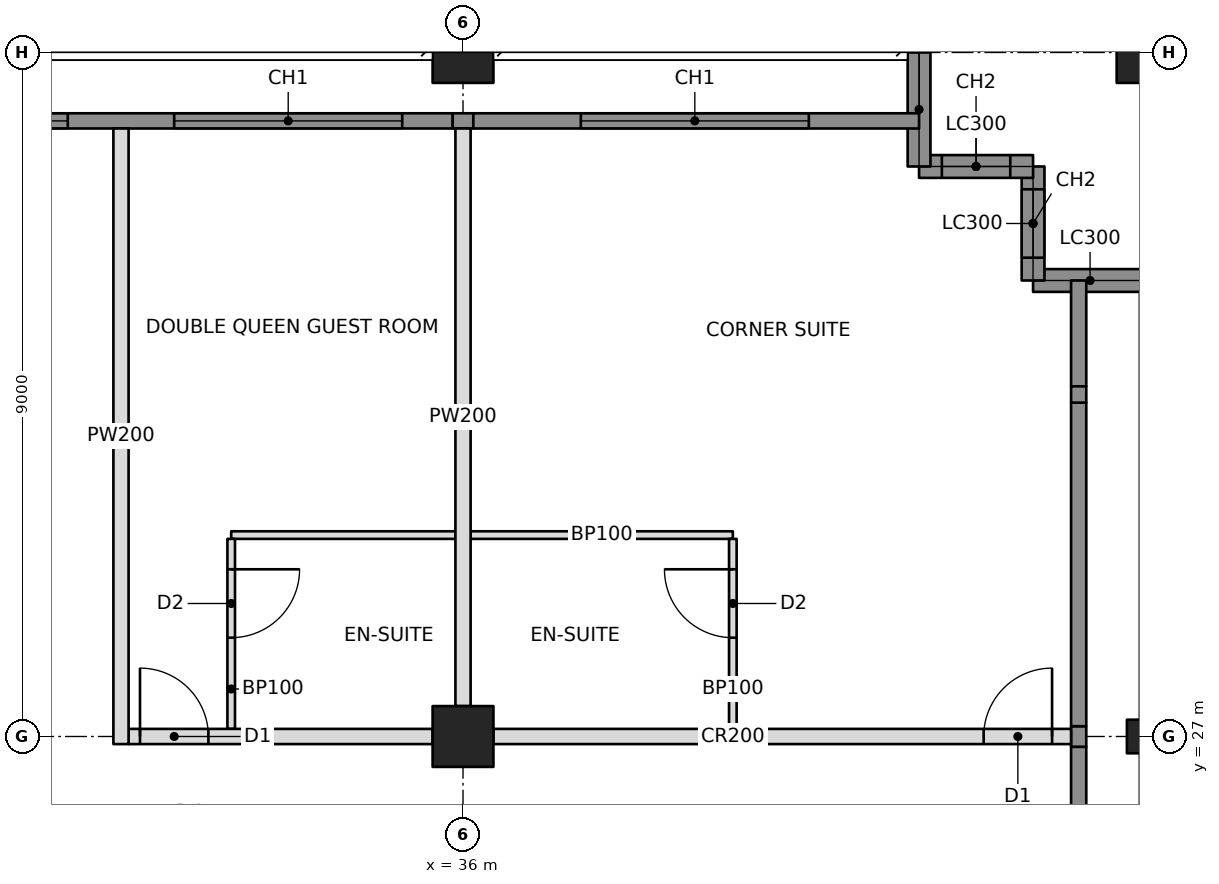
"""IFC4 building model, lengths in metres.
Left out: names, types, materials, properties, quantities, classifications, styles, units other than length and angle.
Written with IfcOpenShell. Run it as: python <this file> out.ifc"""

import sys

from ifc_helpers import new_model, si_unit, direction, frame, frame_2d, origin, origin_2d, place, context, subcontext, project, spatial, rectangle, hollow_rectangle, i_section, extrude, element, fill, save


model = new_model("IFC4")
c1 = context("Model", 3, precision=1e-05, world=origin(), true_north=direction((0.0, 1.0)))
c2 = subcontext(c1, "Body", "Model", "MODEL_VIEW")
j1 = project(units=[si_unit("LENGTHUNIT", "METRE"), si_unit("PLANEANGLEUNIT", "RADIAN")], contexts=[c1])
p1 = place(None, origin())
s1 = spatial("IfcSite", under=j1, at=p1, CompositionType="ELEMENT")
p2 = place(p1, origin())
s2 = spatial("IfcBuilding", under=s1, at=p2, CompositionType="ELEMENT")
p3 = place(p2, frame((0.0, 0.0, 124.8)))
s3 = spatial("IfcBuildingStorey", under=s2, at=p3, CompositionType="ELEMENT", Elevation=124.8)
p4 = place(p3, frame((36.0, 27.0, 0.0), z_axis=(0.0, 0.0, 1.0), x_axis=(1.0, 0.0, 0.0)))
e1 = element("IfcColumn", 1, at=p4, inside=s3, PredefinedType="COLUMN", context=c2, shape_type="SweptSolid", body=[
    extrude(hollow_rectangle(XDim=0.8, YDim=0.8, WallThickness=0.07, at=origin_2d()), origin(), (0.0, 0.0, 1.0), 3.4),
])
p5 = place(p3, frame((36.0, 36.0, 0.0), z_axis=(0.0, 0.0, 1.0), x_axis=(1.0, 0.0, 0.0)))
e2 = element("IfcColumn", 2, at=p5, inside=s3, PredefinedType="COLUMN", context=c2, shape_type="SweptSolid", body=[
    extrude(hollow_rectangle(XDim=0.8, YDim=0.8, WallThickness=0.06, at=origin_2d()), origin(), (0.0, 0.0, 1.0), 3.4),
])
p6 = place(p3, frame((45.0, 27.0, 0.0), z_axis=(0.0, 0.0, 1.0), x_axis=(0.0, 1.0, 0.0)))
e3 = element("IfcColumn", 3, at=p6, inside=s3, PredefinedType="COLUMN", context=c2, shape_type="SweptSolid", body=[
    extrude(i_section(OverallWidth=0.442, OverallDepth=0.531, WebThickness=0.066, FlangeThickness=0.106, at=origin_2d()), origin(), (0.0, 0.0, 1.0), 3.4),
])
p7 = place(p3, frame((45.0, 36.0, 0.0), z_axis=(0.0, 0.0, 1.0), x_axis=(1.0, 0.0, 0.0)))
e4 = element("IfcColumn", 4, at=p7, inside=s3, PredefinedType="COLUMN", context=c2, shape_type="SweptSolid", body=[
    extrude(hollow_rectangle(XDim=0.8, YDim=0.8, WallThickness=0.06, at=origin_2d()), origin(), (0.0, 0.0, 1.0), 3.4),
])
p8 = place(p3, frame((45.0, 33.0, 0.0), z_axis=(0.0, 0.0, 1.0), x_axis=(-1.0, 0.0, 0.0)))
e5 = element("IfcWall", 5, at=p8, inside=s3, PredefinedType="SOLIDWALL", context=c2, shape_type="SweptSolid", body=[
    extrude(rectangle(XDim=1.5, YDim=0.3, at=frame_2d((0.75, 0.0))), origin(), (0.0, 0.0, 1.0), 2.42),
])
p9 = place(p3, frame((43.5, 33.0, 0.0), z_axis=(0.0, 0.0, 1.0), x_axis=(0.0, 1.0, 0.0)))
e6 = element("IfcWall", 6, at=p9, inside=s3, PredefinedType="SOLIDWALL", context=c2, shape_type="SweptSolid", body=[
    extrude(rectangle(XDim=1.5, YDim=0.3, at=frame_2d((0.75, 0.0))), origin(), (0.0, 0.0, 1.0), 3.2),
])
p10 = place(p9, frame((0.3, 0.0, 0.6)))
e7 = element("IfcOpeningElement", 7, at=p10, cuts=e6, PredefinedType="OPENING", context=c2, shape_type="SweptSolid", body=[
    extrude(rectangle(XDim=0.9, YDim=2.2, at=frame_2d((0.45, 1.1))), frame((0.0, 0.16, 0.0), z_axis=(0.0, -1.0, 0.0), x_axis=(1.0, 0.0, 0.0)), (0.0, 0.0, 1.0), 0.32),
])
p11 = place(p3, frame((43.5, 34.5, 0.0), z_axis=(0.0, 0.0, 1.0), x_axis=(-1.0, 0.0, 0.0)))
e8 = element("IfcWall", 8, at=p11, inside=s3, PredefinedType="SOLIDWALL", context=c2, shape_type="SweptSolid", body=[
    extrude(rectangle(XDim=1.5, YDim=0.3, at=frame_2d((0.75, 0.0))), origin(), (0.0, 0.0, 1.0), 3.2),
])
p12 = place(p11, frame((0.3, 0.0, 0.6)))
e9 = element("IfcOpeningElement", 9, at=p12, cuts=e8, PredefinedType="OPENING", context=c2, shape_type="SweptSolid", body=[
    extrude(rectangle(XDim=0.9, YDim=2.2, at=frame_2d((0.45, 1.1))), frame((0.0, 0.16, 0.0), z_axis=(0.0, -1.0, 0.0), x_axis=(1.0, 0.0, 0.0)), (0.0, 0.0, 1.0), 0.32),
])
p13 = place(p3, frame((42.0, 34.5, 0.0), z_axis=(0.0, 0.0, 1.0), x_axis=(0.0, 1.0, 0.0)))
e10 = element("IfcWall", 10, at=p13, inside=s3, PredefinedType="SOLIDWALL", context=c2, shape_type="SweptSolid", body=[
    extrude(rectangle(XDim=1.5, YDim=0.3, at=frame_2d((0.75, 0.0))), origin(), (0.0, 0.0, 1.0), 2.42),
])
p14 = place(p3, frame((31.6, 27.0, 0.0), z_axis=(0.0, 0.0, 1.0), x_axis=(1.0, 0.0, 0.0)))
e11 = element("IfcWall", 11, at=p14, inside=s3, PredefinedType="PARTITIONING", context=c2, shape_type="SweptSolid", body=[
    extrude(rectangle(XDim=4.0, YDim=0.2, at=frame_2d((2.0, 0.0))), origin(), (0.0, 0.0, 1.0), 2.405),
])
p15 = place(p14, frame((0.15, 0.0, 0.0)))
e12 = element("IfcOpeningElement", 12, at=p15, cuts=e11, PredefinedType="OPENING", context=c2, shape_type="SweptSolid", body=[
    extrude(rectangle(XDim=0.9, YDim=2.1, at=frame_2d((0.45, 1.05))), frame((0.0, 0.11, 0.0), z_axis=(0.0, -1.0, 0.0), x_axis=(1.0, 0.0, 0.0)), (0.0, 0.0, 1.0), 0.22),
])
p16 = place(p3, frame((36.4, 27.0, 0.0), z_axis=(0.0, 0.0, 1.0), x_axis=(1.0, 0.0, 0.0)))
e13 = element("IfcWall", 13, at=p16, inside=s3, PredefinedType="PARTITIONING", context=c2, shape_type="SweptSolid", body=[
    extrude(rectangle(XDim=7.6, YDim=0.2, at=frame_2d((3.8, 0.0))), origin(), (0.0, 0.0, 1.0), 2.438),
])
p17 = place(p16, frame((6.45, 0.0, 0.0)))
e14 = element("IfcOpeningElement", 14, at=p17, cuts=e13, PredefinedType="OPENING", context=c2, shape_type="SweptSolid", body=[
    extrude(rectangle(XDim=0.9, YDim=2.1, at=frame_2d((0.45, 1.05))), frame((0.0, 0.11, 0.0), z_axis=(0.0, -1.0, 0.0), x_axis=(1.0, 0.0, 0.0)), (0.0, 0.0, 1.0), 0.22),
])
p18 = place(p3, frame((31.5, 26.9, 0.0), z_axis=(0.0, 0.0, 1.0), x_axis=(0.0, 1.0, 0.0)))
e15 = element("IfcWall", 15, at=p18, inside=s3, PredefinedType="PARTITIONING", context=c2, shape_type="SweptSolid", body=[
    extrude(rectangle(XDim=8.1, YDim=0.2, at=frame_2d((4.05, 0.0))), origin(), (0.0, 0.0, 1.0), 2.404),
])
p19 = place(p3, frame((36.0, 27.4, 0.0), z_axis=(0.0, 0.0, 1.0), x_axis=(0.0, 1.0, 0.0)))
e16 = element("IfcWall", 16, at=p19, inside=s3, PredefinedType="PARTITIONING", context=c2, shape_type="SweptSolid", body=[
    extrude(rectangle(XDim=7.6, YDim=0.2, at=frame_2d((3.8, 0.0))), origin(), (0.0, 0.0, 1.0), 2.438),
])
p20 = place(p3, frame((32.95, 29.65, 0.0), z_axis=(0.0, 0.0, 1.0), x_axis=(1.0, 0.0, 0.0)))
e17 = element("IfcWall", 17, at=p20, inside=s3, PredefinedType="PARTITIONING", context=c2, shape_type="SweptSolid", body=[
    extrude(rectangle(XDim=2.95, YDim=0.1, at=frame_2d((1.475, 0.0))), origin(), (0.0, 0.0, 1.0), 2.438),
])
p21 = place(p3, frame((32.95, 27.1, 0.0), z_axis=(0.0, 0.0, 1.0), x_axis=(0.0, 1.0, 0.0)))
e18 = element("IfcWall", 18, at=p21, inside=s3, PredefinedType="PARTITIONING", context=c2, shape_type="SweptSolid", body=[
    extrude(rectangle(XDim=2.5, YDim=0.1, at=frame_2d((1.25, 0.0))), origin(), (0.0, 0.0, 1.0), 2.404),
])
p22 = place(p21, frame((1.2, 0.0, 0.0)))
e19 = element("IfcOpeningElement", 19, at=p22, cuts=e18, PredefinedType="OPENING", context=c2, shape_type="SweptSolid", body=[
    extrude(rectangle(XDim=0.9, YDim=2.1, at=frame_2d((0.45, 1.05))), frame((0.0, 0.06, 0.0), z_axis=(0.0, -1.0, 0.0), x_axis=(1.0, 0.0, 0.0)), (0.0, 0.0, 1.0), 0.12),
])
p23 = place(p3, frame((36.1, 29.65, 0.0), z_axis=(0.0, 0.0, 1.0), x_axis=(1.0, 0.0, 0.0)))
e20 = element("IfcWall", 20, at=p23, inside=s3, PredefinedType="PARTITIONING", context=c2, shape_type="SweptSolid", body=[
    extrude(rectangle(XDim=3.45, YDim=0.1, at=frame_2d((1.725, 0.0))), origin(), (0.0, 0.0, 1.0), 2.438),
])
p24 = place(p3, frame((39.55, 27.1, 0.0), z_axis=(0.0, 0.0, 1.0), x_axis=(0.0, 1.0, 0.0)))
e21 = element("IfcWall", 21, at=p24, inside=s3, PredefinedType="PARTITIONING", context=c2, shape_type="SweptSolid", body=[
    extrude(rectangle(XDim=2.5, YDim=0.1, at=frame_2d((1.25, 0.0))), origin(), (0.0, 0.0, 1.0), 2.438),
])
p25 = place(p24, frame((1.2, 0.0, 0.0)))
e22 = element("IfcOpeningElement", 22, at=p25, cuts=e21, PredefinedType="OPENING", context=c2, shape_type="SweptSolid", body=[
    extrude(rectangle(XDim=0.9, YDim=2.1, at=frame_2d((0.45, 1.05))), frame((0.0, 0.06, 0.0), z_axis=(0.0, -1.0, 0.0), x_axis=(1.0, 0.0, 0.0)), (0.0, 0.0, 1.0), 0.12),
])
p26 = place(p3, frame((27.194, 35.1, 0.0), z_axis=(0.0, 0.0, 1.0), x_axis=(1.0, 0.0, 0.0)))
e23 = element("IfcWall", 23, at=p26, inside=s3, PredefinedType="SOLIDWALL", context=c2, shape_type="SweptSolid", body=[
    extrude(rectangle(XDim=8.671, YDim=0.2, at=frame_2d((4.335, 0.0))), origin(), (0.0, 0.0, 1.0), 3.2),
])
p27 = place(p26, frame((0.606, 0.0, 0.6)))
e24 = element("IfcOpeningElement", 24, at=p27, cuts=e23, PredefinedType="OPENING", context=c2, shape_type="SweptSolid", body=[
    extrude(rectangle(XDim=3.0, YDim=2.2, at=frame_2d((1.5, 1.1))), frame((0.0, 0.11, 0.0), z_axis=(0.0, -1.0, 0.0), x_axis=(1.0, 0.0, 0.0)), (0.0, 0.0, 1.0), 0.22),
])
p28 = place(p26, frame((5.006, 0.0, 0.6)))
e25 = element("IfcOpeningElement", 25, at=p28, cuts=e23, PredefinedType="OPENING", context=c2, shape_type="SweptSolid", body=[
    extrude(rectangle(XDim=3.0, YDim=2.2, at=frame_2d((1.5, 1.1))), frame((0.0, 0.11, 0.0), z_axis=(0.0, -1.0, 0.0), x_axis=(1.0, 0.0, 0.0)), (0.0, 0.0, 1.0), 0.22),
])
p29 = place(p3, frame((35.865, 35.1, 0.0), z_axis=(0.0, 0.0, 1.0), x_axis=(1.0, 0.0, 0.0)))
e26 = element("IfcWall", 26, at=p29, inside=s3, PredefinedType="SOLIDWALL", context=c2, shape_type="SweptSolid", body=[
    extrude(rectangle(XDim=0.271, YDim=0.2, at=frame_2d((0.135, 0.0))), origin(), (0.0, 0.0, 1.0), 2.438),
])
p30 = place(p3, frame((36.135, 35.1, 0.0), z_axis=(0.0, 0.0, 1.0), x_axis=(1.0, 0.0, 0.0)))
e27 = element("IfcWall", 27, at=p30, inside=s3, PredefinedType="SOLIDWALL", context=c2, shape_type="SweptSolid", body=[
    extrude(rectangle(XDim=5.865, YDim=0.2, at=frame_2d((2.932, 0.0))), origin(), (0.0, 0.0, 1.0), 3.2),
])
p31 = place(p30, frame((1.415, 0.0, 0.6)))
e28 = element("IfcOpeningElement", 28, at=p31, cuts=e27, PredefinedType="OPENING", context=c2, shape_type="SweptSolid", body=[
    extrude(rectangle(XDim=3.0, YDim=2.2, at=frame_2d((1.5, 1.1))), frame((0.0, 0.11, 0.0), z_axis=(0.0, -1.0, 0.0), x_axis=(1.0, 0.0, 0.0)), (0.0, 0.0, 1.0), 0.22),
])
p32 = place(p3, frame((44.1, 18.194, 0.0), z_axis=(0.0, 0.0, 1.0), x_axis=(0.0, 1.0, 0.0)))
e29 = element("IfcWall", 29, at=p32, inside=s3, PredefinedType="SOLIDWALL", context=c2, shape_type="SweptSolid", body=[
    extrude(rectangle(XDim=8.671, YDim=0.2, at=frame_2d((4.335, 0.0))), origin(), (0.0, 0.0, 1.0), 3.2),
])
p33 = place(p32, frame((0.156, 0.0, 0.6)))
e30 = element("IfcOpeningElement", 30, at=p33, cuts=e29, PredefinedType="OPENING", context=c2, shape_type="SweptSolid", body=[
    extrude(rectangle(XDim=3.0, YDim=2.2, at=frame_2d((1.5, 1.1))), frame((0.0, 0.11, 0.0), z_axis=(0.0, -1.0, 0.0), x_axis=(1.0, 0.0, 0.0)), (0.0, 0.0, 1.0), 0.22),
])
p34 = place(p32, frame((3.656, 0.0, 0.6)))
e31 = element("IfcOpeningElement", 31, at=p34, cuts=e29, PredefinedType="OPENING", context=c2, shape_type="SweptSolid", body=[
    extrude(rectangle(XDim=3.0, YDim=2.2, at=frame_2d((1.5, 1.1))), frame((0.0, 0.11, 0.0), z_axis=(0.0, -1.0, 0.0), x_axis=(1.0, 0.0, 0.0)), (0.0, 0.0, 1.0), 0.22),
])
p35 = place(p3, frame((44.1, 26.865, 0.0), z_axis=(0.0, 0.0, 1.0), x_axis=(0.0, 1.0, 0.0)))
e32 = element("IfcWall", 32, at=p35, inside=s3, PredefinedType="SOLIDWALL", context=c2, shape_type="SweptSolid", body=[
    extrude(rectangle(XDim=0.271, YDim=0.2, at=frame_2d((0.135, 0.0))), origin(), (0.0, 0.0, 1.0), 2.438),
])
p36 = place(p3, frame((44.1, 27.135, 0.0), z_axis=(0.0, 0.0, 1.0), x_axis=(0.0, 1.0, 0.0)))
e33 = element("IfcWall", 33, at=p36, inside=s3, PredefinedType="SOLIDWALL", context=c2, shape_type="SweptSolid", body=[
    extrude(rectangle(XDim=4.257, YDim=0.2, at=frame_2d((2.129, 0.0))), origin(), (0.0, 0.0, 1.0), 3.2),
])
p37 = place(p3, frame((44.1, 31.393, 0.0), z_axis=(0.0, 0.0, 1.0), x_axis=(0.0, 1.0, 0.0)))
e34 = element("IfcWall", 34, at=p37, inside=s3, PredefinedType="SOLIDWALL", context=c2, shape_type="SweptSolid", body=[
    extrude(rectangle(XDim=0.215, YDim=0.2, at=frame_2d((0.107, 0.0))), origin(), (0.0, 0.0, 1.0), 2.661),
])
p38 = place(p3, frame((44.1, 31.607, 0.0), z_axis=(0.0, 0.0, 1.0), x_axis=(0.0, 1.0, 0.0)))
e35 = element("IfcWall", 35, at=p38, inside=s3, PredefinedType="SOLIDWALL", context=c2, shape_type="SweptSolid", body=[
    extrude(rectangle(XDim=1.393, YDim=0.2, at=frame_2d((0.696, 0.0))), origin(), (0.0, 0.0, 1.0), 3.2),
])
p39 = place(p10, origin())
e36 = element("IfcWindow", 36, at=p39, inside=s3, PartitioningType="SINGLE_PANEL", PredefinedType="WINDOW", context=c2, shape_type="SweptSolid", body=[
    extrude(rectangle(XDim=0.9, YDim=2.2, at=frame_2d((0.45, 1.1))), frame((0.0, 0.03, 0.0), z_axis=(0.0, -1.0, 0.0), x_axis=(1.0, 0.0, 0.0)), (0.0, 0.0, 1.0), 0.06),
])
fill(e7, e36)
p40 = place(p12, origin())
e37 = element("IfcWindow", 37, at=p40, inside=s3, PartitioningType="SINGLE_PANEL", PredefinedType="WINDOW", context=c2, shape_type="SweptSolid", body=[
    extrude(rectangle(XDim=0.9, YDim=2.2, at=frame_2d((0.45, 1.1))), frame((0.0, 0.03, 0.0), z_axis=(0.0, -1.0, 0.0), x_axis=(1.0, 0.0, 0.0)), (0.0, 0.0, 1.0), 0.06),
])
fill(e9, e37)
p41 = place(p27, origin())
e38 = element("IfcWindow", 38, at=p41, inside=s3, PartitioningType="TRIPLE_PANEL_VERTICAL", PredefinedType="WINDOW", context=c2, shape_type="SweptSolid", body=[
    extrude(rectangle(XDim=3.0, YDim=2.2, at=frame_2d((1.5, 1.1))), frame((0.0, 0.03, 0.0), z_axis=(0.0, -1.0, 0.0), x_axis=(1.0, 0.0, 0.0)), (0.0, 0.0, 1.0), 0.06),
])
fill(e24, e38)
p42 = place(p28, origin())
e39 = element("IfcWindow", 39, at=p42, inside=s3, PartitioningType="TRIPLE_PANEL_VERTICAL", PredefinedType="WINDOW", context=c2, shape_type="SweptSolid", body=[
    extrude(rectangle(XDim=3.0, YDim=2.2, at=frame_2d((1.5, 1.1))), frame((0.0, 0.03, 0.0), z_axis=(0.0, -1.0, 0.0), x_axis=(1.0, 0.0, 0.0)), (0.0, 0.0, 1.0), 0.06),
])
fill(e25, e39)
p43 = place(p31, origin())
e40 = element("IfcWindow", 40, at=p43, inside=s3, PartitioningType="TRIPLE_PANEL_VERTICAL", PredefinedType="WINDOW", context=c2, shape_type="SweptSolid", body=[
    extrude(rectangle(XDim=3.0, YDim=2.2, at=frame_2d((1.5, 1.1))), frame((0.0, 0.03, 0.0), z_axis=(0.0, -1.0, 0.0), x_axis=(1.0, 0.0, 0.0)), (0.0, 0.0, 1.0), 0.06),
])
fill(e28, e40)
p44 = place(p22, frame((0.9, 0.0, 0.0), z_axis=(0.0, 0.0, 1.0), x_axis=(-1.0, 0.0, 0.0)))
e41 = element("IfcDoor", 41, at=p44, inside=s3, OperationType="SINGLE_SWING_LEFT", PredefinedType="DOOR", context=c2, shape_type="SweptSolid", body=[
    extrude(rectangle(XDim=0.9, YDim=2.1, at=frame_2d((0.45, 1.05))), frame((0.0, 0.025, 0.0), z_axis=(0.0, -1.0, 0.0), x_axis=(1.0, 0.0, 0.0)), (0.0, 0.0, 1.0), 0.05),
])
fill(e19, e41)
p45 = place(p15, origin())
e42 = element("IfcDoor", 42, at=p45, inside=s3, OperationType="SINGLE_SWING_LEFT", PredefinedType="DOOR", context=c2, shape_type="SweptSolid", body=[
    extrude(rectangle(XDim=0.9, YDim=2.1, at=frame_2d((0.45, 1.05))), frame((0.0, 0.025, 0.0), z_axis=(0.0, -1.0, 0.0), x_axis=(1.0, 0.0, 0.0)), (0.0, 0.0, 1.0), 0.05),
])
fill(e12, e42)
p46 = place(p25, origin())
e43 = element("IfcDoor", 43, at=p46, inside=s3, OperationType="SINGLE_SWING_RIGHT", PredefinedType="DOOR", context=c2, shape_type="SweptSolid", body=[
    extrude(rectangle(XDim=0.9, YDim=2.1, at=frame_2d((0.45, 1.05))), frame((0.0, 0.025, 0.0), z_axis=(0.0, -1.0, 0.0), x_axis=(1.0, 0.0, 0.0)), (0.0, 0.0, 1.0), 0.05),
])
fill(e22, e43)
p47 = place(p17, origin())
e44 = element("IfcDoor", 44, at=p47, inside=s3, OperationType="SINGLE_SWING_RIGHT", PredefinedType="DOOR", context=c2, shape_type="SweptSolid", body=[
    extrude(rectangle(XDim=0.9, YDim=2.1, at=frame_2d((0.45, 1.05))), frame((0.0, 0.025, 0.0), z_axis=(0.0, -1.0, 0.0), x_axis=(1.0, 0.0, 0.0)), (0.0, 0.0, 1.0), 0.05),
])
fill(e14, e44)
save(model, sys.argv[1])
